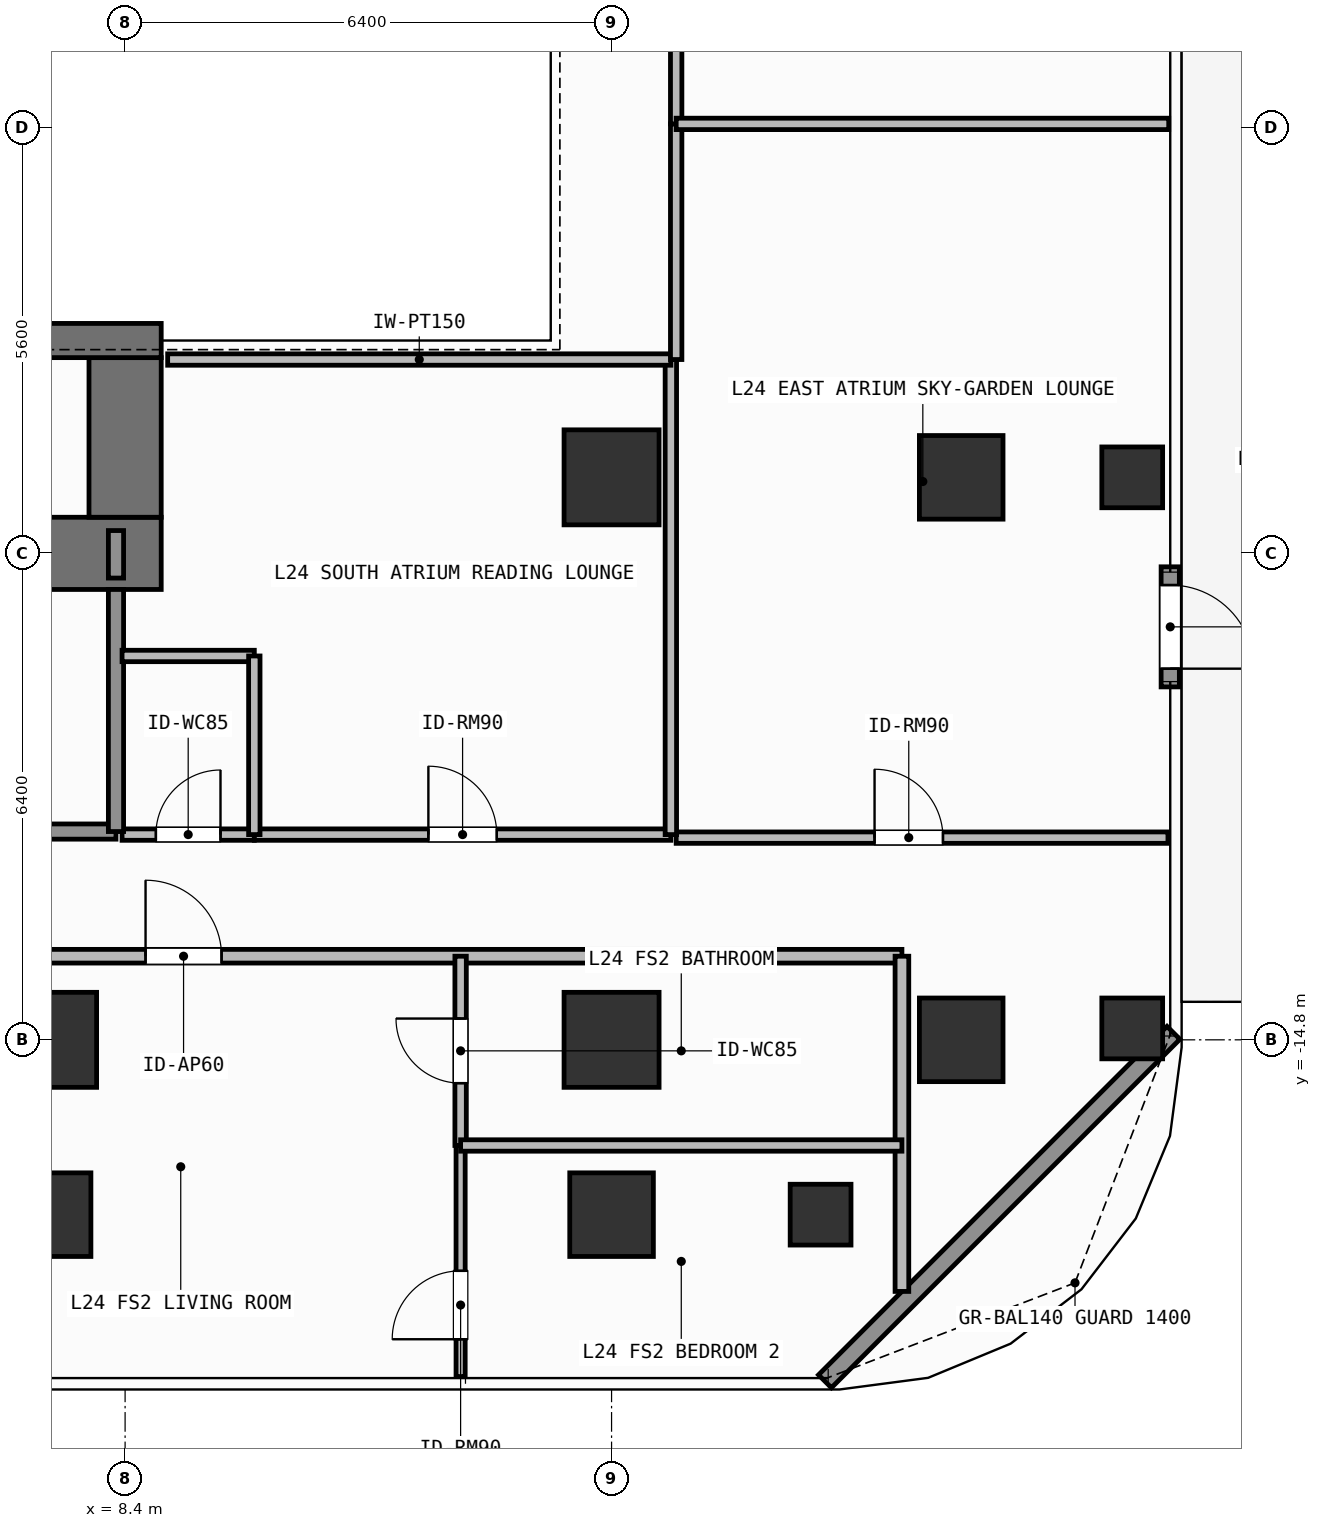
"""IFC4 building model, lengths in metres.
Left out: names, types, materials, properties, quantities, classifications, styles, units other than length and angle.
Written with IfcOpenShell. Run it as: python <this file> out.ifc"""

import sys

from ifc_helpers import new_model, si_unit, direction, frame, frame_2d, origin, origin_2d, place, context, subcontext, project, spatial, rectangle, hollow_rectangle, extrude, element, fill, save


model = new_model("IFC4")
c1 = context("Model", 3, precision=1e-05, world=origin(), true_north=direction((0.0, 1.0)))
c2 = subcontext(c1, "Body", "Model", "MODEL_VIEW")
j1 = project(units=[si_unit("LENGTHUNIT", "METRE"), si_unit("PLANEANGLEUNIT", "RADIAN")], contexts=[c1])
p1 = place(None, origin())
s1 = spatial("IfcSite", under=j1, at=p1, CompositionType="ELEMENT")
p2 = place(p1, origin())
s2 = spatial("IfcBuilding", under=s1, at=p2, CompositionType="ELEMENT")
p3 = place(p2, frame((0.0, 0.0, 96.9)))
s3 = spatial("IfcBuildingStorey", under=s2, at=p3, CompositionType="ELEMENT", Elevation=96.9)
p4 = place(p3, frame((6.12, -8.4, 0.0), z_axis=(0.0, 0.0, 1.0), x_axis=(1.0, 0.0, 0.0)))
e1 = element("IfcWall", 1, at=p4, inside=s3, PredefinedType="SHEAR", context=c2, shape_type="SweptSolid", body=[
    extrude(rectangle(XDim=2.755, YDim=0.95, at=frame_2d((1.377, 0.0))), origin(), (0.0, 0.0, 1.0), 3.9),
])
p5 = place(p3, frame((8.4, -7.925, 0.0), z_axis=(0.0, 0.0, 1.0), x_axis=(0.0, 1.0, 0.0)))
e2 = element("IfcWall", 2, at=p5, inside=s3, PredefinedType="SHEAR", context=c2, shape_type="SweptSolid", body=[
    extrude(rectangle(XDim=2.1, YDim=0.95, at=frame_2d((1.05, 0.0))), origin(), (0.0, 0.0, 1.0), 3.9),
])
p6 = place(p3, frame((3.045, -5.6, 0.0), z_axis=(0.0, 0.0, 1.0), x_axis=(1.0, 0.0, 0.0)))
e3 = element("IfcWall", 3, at=p6, inside=s3, PredefinedType="SHEAR", context=c2, shape_type="SweptSolid", body=[
    extrude(rectangle(XDim=5.83, YDim=0.45, at=frame_2d((2.915, 0.0))), origin(), (0.0, 0.0, 1.0), 3.9),
])
for number, where, z_axis, x_axis in (
    (4, (7.4, -14.8, 0.0), (0.0, 0.0, 1.0), (1.0, 0.0, 0.0)),
    (5, (14.8, -14.8, 0.0), (0.0, 0.0, 1.0), (1.0, 0.0, 0.0)),
    (6, (14.8, -7.4, 0.0), (0.0, 0.0, 1.0), (1.0, 0.0, 0.0)),
):
    element("IfcColumn", number, at=place(p3, frame(where, z_axis=z_axis, x_axis=x_axis)), inside=s3, PredefinedType="COLUMN", context=c2, shape_type="SweptSolid", body=[
        extrude(rectangle(XDim=1.25, YDim=1.25, at=origin_2d()), origin(), (0.0, 0.0, 1.0), 3.9),
    ])
for number, where, z_axis, x_axis in (
    (7, (19.4, -14.8, 0.0), (0.0, 0.0, 1.0), (1.0, 0.0, 0.0)),
    (8, (19.4, -7.4, 0.0), (0.0, 0.0, 1.0), (1.0, 0.0, 0.0)),
    (9, (7.4, -17.1, 0.0), (0.0, 0.0, 1.0), (1.0, 0.0, 0.0)),
    (10, (14.8, -17.1, 0.0), (0.0, 0.0, 1.0), (1.0, 0.0, 0.0)),
):
    element("IfcColumn", number, at=place(p3, frame(where, z_axis=z_axis, x_axis=x_axis)), inside=s3, PredefinedType="COLUMN", context=c2, shape_type="SweptSolid", body=[
        extrude(rectangle(XDim=1.1, YDim=1.1, at=origin_2d()), origin(), (0.0, 0.0, 1.0), 3.9),
    ])
for number, where, z_axis, x_axis in (
    (11, (17.55, -17.1, 0.0), (0.0, 0.0, 1.0), (1.0, 0.0, 0.0)),
    (12, (21.65, -14.65, 0.0), (0.0, 0.0, 1.0), (1.0, 0.0, 0.0)),
    (13, (21.65, -7.4, 0.0), (0.0, 0.0, 1.0), (1.0, 0.0, 0.0)),
):
    element("IfcColumn", number, at=place(p3, frame(where, z_axis=z_axis, x_axis=x_axis)), inside=s3, PredefinedType="COLUMN", context=c2, shape_type="SweptSolid", body=[
        extrude(hollow_rectangle(XDim=0.8, YDim=0.8, WallThickness=0.036, at=origin_2d()), origin(), (0.0, 0.0, 1.0), 3.9),
    ])
p7 = place(p3, frame((22.15, -8.577, 0.0), z_axis=(0.0, 0.0, 1.0), x_axis=(0.0, -1.0, 0.0)))
e14 = element("IfcWall", 14, at=p7, inside=s3, PredefinedType="SOLIDWALL", context=c2, shape_type="SweptSolid", body=[
    extrude(rectangle(XDim=1.58, YDim=0.24, at=frame_2d((0.79, 0.0))), origin(), (0.0, 0.0, 1.0), 3.68),
])
p8 = place(p7, frame((0.24, 0.0, 0.0)))
e15 = element("IfcOpeningElement", 15, at=p8, cuts=e14, PredefinedType="OPENING", context=c2, shape_type="SweptSolid", body=[
    extrude(rectangle(XDim=1.1, YDim=2.2, at=frame_2d((0.55, 1.1))), frame((0.0, 0.13, 0.0), z_axis=(0.0, -1.0, 0.0), x_axis=(1.0, 0.0, 0.0)), (0.0, 0.0, 1.0), 0.26),
])
p9 = place(p3, frame((22.192, -14.708, 0.0), z_axis=(0.0, 0.0, 1.0), x_axis=(-0.707087954376, -0.707125607496, 0.0)))
e16 = element("IfcWall", 16, at=p9, inside=s3, PredefinedType="SOLIDWALL", context=c2, shape_type="SweptSolid", body=[
    extrude(rectangle(XDim=6.484, YDim=0.24, at=frame_2d((3.242, 0.0))), origin(), (0.0, 0.0, 1.0), 3.68),
])
p10 = place(p3, frame((4.58, -12.06, 0.0), z_axis=(0.0, 0.0, 1.0), x_axis=(1.0, 0.0, 0.0)))
e17 = element("IfcWall", 17, at=p10, inside=s3, PredefinedType="SOLIDWALL", context=c2, shape_type="SweptSolid", body=[
    extrude(rectangle(XDim=3.7, YDim=0.2, at=frame_2d((1.85, 0.0))), origin(), (0.0, 0.0, 1.0), 3.68),
])
p11 = place(p10, frame((1.212, 0.0, 0.0)))
e18 = element("IfcOpeningElement", 18, at=p11, cuts=e17, PredefinedType="OPENING", context=c2, shape_type="SweptSolid", body=[
    extrude(rectangle(XDim=1.1, YDim=2.15, at=frame_2d((0.55, 1.075))), frame((0.0, 0.11, 0.0), z_axis=(0.0, -1.0, 0.0), x_axis=(1.0, 0.0, 0.0)), (0.0, 0.0, 1.0), 0.22),
])
p12 = place(p3, frame((8.36, -12.1, 0.0), z_axis=(0.0, 0.0, 1.0), x_axis=(1.0, 0.0, 0.0)))
e19 = element("IfcWall", 19, at=p12, inside=s3, PredefinedType="PARTITIONING", context=c2, shape_type="SweptSolid", body=[
    extrude(rectangle(XDim=1.74, YDim=0.15, at=frame_2d((0.87, 0.0))), origin(), (0.0, 0.0, 1.0), 3.68),
])
p13 = place(p12, frame((0.445, 0.0, 0.0)))
e20 = element("IfcOpeningElement", 20, at=p13, cuts=e19, PredefinedType="OPENING", context=c2, shape_type="SweptSolid", body=[
    extrude(rectangle(XDim=0.85, YDim=2.1, at=frame_2d((0.425, 1.05))), frame((0.0, 0.085, 0.0), z_axis=(0.0, -1.0, 0.0), x_axis=(1.0, 0.0, 0.0)), (0.0, 0.0, 1.0), 0.17),
])
p14 = place(p3, frame((10.1, -12.1, 0.0), z_axis=(0.0, 0.0, 1.0), x_axis=(1.0, 0.0, 0.0)))
e21 = element("IfcWall", 21, at=p14, inside=s3, PredefinedType="PARTITIONING", context=c2, shape_type="SweptSolid", body=[
    extrude(rectangle(XDim=5.48, YDim=0.15, at=frame_2d((2.74, 0.0))), origin(), (0.0, 0.0, 1.0), 3.68),
])
p15 = place(p14, frame((2.29, 0.0, 0.0)))
e22 = element("IfcOpeningElement", 22, at=p15, cuts=e21, PredefinedType="OPENING", context=c2, shape_type="SweptSolid", body=[
    extrude(rectangle(XDim=0.9, YDim=2.1, at=frame_2d((0.45, 1.05))), frame((0.0, 0.085, 0.0), z_axis=(0.0, -1.0, 0.0), x_axis=(1.0, 0.0, 0.0)), (0.0, 0.0, 1.0), 0.17),
])
p16 = place(p3, frame((0.974, -13.7, 0.0), z_axis=(0.0, 0.0, 1.0), x_axis=(1.0, 0.0, 0.0)))
e23 = element("IfcWall", 23, at=p16, inside=s3, PredefinedType="PARTITIONING", context=c2, shape_type="SweptSolid", body=[
    extrude(rectangle(XDim=17.646, YDim=0.18, at=frame_2d((8.823, 0.0))), origin(), (0.0, 0.0, 1.0), 3.68),
])
p17 = place(p16, frame((7.695, 0.0, 0.0)))
e24 = element("IfcOpeningElement", 24, at=p17, cuts=e23, PredefinedType="OPENING", context=c2, shape_type="SweptSolid", body=[
    extrude(rectangle(XDim=1.0, YDim=2.2, at=frame_2d((0.5, 1.1))), frame((0.0, 0.1, 0.0), z_axis=(0.0, -1.0, 0.0), x_axis=(1.0, 0.0, 0.0)), (0.0, 0.0, 1.0), 0.2),
])
p18 = place(p3, frame((12.814, -16.19, 0.0), z_axis=(0.0, 0.0, 1.0), x_axis=(0.0, 1.0, 0.0)))
e25 = element("IfcWall", 25, at=p18, inside=s3, PredefinedType="PARTITIONING", context=c2, shape_type="SweptSolid", body=[
    extrude(rectangle(XDim=2.49, YDim=0.15, at=frame_2d((1.245, 0.0))), origin(), (0.0, 0.0, 1.0), 3.68),
])
p19 = place(p18, frame((0.82, 0.0, 0.0)))
e26 = element("IfcOpeningElement", 26, at=p19, cuts=e25, PredefinedType="OPENING", context=c2, shape_type="SweptSolid", body=[
    extrude(rectangle(XDim=0.85, YDim=2.1, at=frame_2d((0.425, 1.05))), frame((0.0, 0.085, 0.0), z_axis=(0.0, -1.0, 0.0), x_axis=(1.0, 0.0, 0.0)), (0.0, 0.0, 1.0), 0.17),
])
p20 = place(p3, frame((12.814, -19.23, 0.0), z_axis=(0.0, 0.0, 1.0), x_axis=(0.0, 1.0, 0.0)))
e27 = element("IfcWall", 27, at=p20, inside=s3, PredefinedType="PARTITIONING", context=c2, shape_type="SweptSolid", body=[
    extrude(rectangle(XDim=3.04, YDim=0.12, at=frame_2d((1.52, 0.0))), origin(), (0.0, 0.0, 1.0), 3.68),
])
p21 = place(p20, frame((0.491, 0.0, 0.0)))
e28 = element("IfcOpeningElement", 28, at=p21, cuts=e27, PredefinedType="OPENING", context=c2, shape_type="SweptSolid", body=[
    extrude(rectangle(XDim=0.9, YDim=2.1, at=frame_2d((0.45, 1.05))), frame((0.0, 0.07, 0.0), z_axis=(0.0, -1.0, 0.0), x_axis=(1.0, 0.0, 0.0)), (0.0, 0.0, 1.0), 0.14),
])
p22 = place(p3, frame((15.65, -12.14, 0.0), z_axis=(0.0, 0.0, 1.0), x_axis=(1.0, 0.0, 0.0)))
e29 = element("IfcWall", 29, at=p22, inside=s3, PredefinedType="PARTITIONING", context=c2, shape_type="SweptSolid", body=[
    extrude(rectangle(XDim=6.47, YDim=0.15, at=frame_2d((3.235, 0.0))), origin(), (0.0, 0.0, 1.0), 3.68),
])
p23 = place(p22, frame((2.61, 0.0, 0.0)))
e30 = element("IfcOpeningElement", 30, at=p23, cuts=e29, PredefinedType="OPENING", context=c2, shape_type="SweptSolid", body=[
    extrude(rectangle(XDim=0.9, YDim=2.1, at=frame_2d((0.45, 1.05))), frame((0.0, 0.085, 0.0), z_axis=(0.0, -1.0, 0.0), x_axis=(1.0, 0.0, 0.0)), (0.0, 0.0, 1.0), 0.17),
])
p24 = place(p3, frame((8.28, -12.06, 0.0), z_axis=(0.0, 0.0, 1.0), x_axis=(0.0, 1.0, 0.0)))
e31 = element("IfcWall", 31, at=p24, inside=s3, PredefinedType="SOLIDWALL", context=c2, shape_type="SweptSolid", body=[
    extrude(rectangle(XDim=3.185, YDim=0.2, at=frame_2d((1.593, 0.0))), origin(), (0.0, 0.0, 1.0), 3.68),
])
p25 = place(p3, frame((8.28, -8.725, 0.0), z_axis=(0.0, 0.0, 1.0), x_axis=(0.0, 1.0, 0.0)))
e32 = element("IfcWall", 32, at=p25, inside=s3, PredefinedType="SOLIDWALL", context=c2, shape_type="SweptSolid", body=[
    extrude(rectangle(XDim=0.625, YDim=0.2, at=frame_2d((0.312, 0.0))), origin(), (0.0, 0.0, 1.0), 3.68),
])
p26 = place(p3, frame((8.36, -9.75, 0.0), z_axis=(0.0, 0.0, 1.0), x_axis=(1.0, 0.0, 0.0)))
e33 = element("IfcWall", 33, at=p26, inside=s3, PredefinedType="PARTITIONING", context=c2, shape_type="SweptSolid", body=[
    extrude(rectangle(XDim=1.74, YDim=0.15, at=frame_2d((0.87, 0.0))), origin(), (0.0, 0.0, 1.0), 3.68),
])
p27 = place(p3, frame((10.1, -12.1, 0.0), z_axis=(0.0, 0.0, 1.0), x_axis=(0.0, 1.0, 0.0)))
e34 = element("IfcWall", 34, at=p27, inside=s3, PredefinedType="PARTITIONING", context=c2, shape_type="SweptSolid", body=[
    extrude(rectangle(XDim=2.35, YDim=0.15, at=frame_2d((1.175, 0.0))), origin(), (0.0, 0.0, 1.0), 3.68),
])
p28 = place(p3, frame((15.58, -12.1, 0.0), z_axis=(0.0, 0.0, 1.0), x_axis=(0.0, 1.0, 0.0)))
e35 = element("IfcWall", 35, at=p28, inside=s3, PredefinedType="PARTITIONING", context=c2, shape_type="SweptSolid", body=[
    extrude(rectangle(XDim=6.25, YDim=0.15, at=frame_2d((3.125, 0.0))), origin(), (0.0, 0.0, 1.0), 3.68),
])
p29 = place(p3, frame((8.96, -5.85, 0.0), z_axis=(0.0, 0.0, 1.0), x_axis=(1.0, 0.0, 0.0)))
e36 = element("IfcWall", 36, at=p29, inside=s3, PredefinedType="PARTITIONING", context=c2, shape_type="SweptSolid", body=[
    extrude(rectangle(XDim=6.62, YDim=0.15, at=frame_2d((3.31, 0.0))), origin(), (0.0, 0.0, 1.0), 3.68),
])
p30 = place(p3, frame((18.62, -18.11, 0.0), z_axis=(0.0, 0.0, 1.0), x_axis=(0.0, 1.0, 0.0)))
e37 = element("IfcWall", 37, at=p30, inside=s3, PredefinedType="PARTITIONING", context=c2, shape_type="SweptSolid", body=[
    extrude(rectangle(XDim=4.41, YDim=0.18, at=frame_2d((2.205, 0.0))), origin(), (0.0, 0.0, 1.0), 3.68),
])
p31 = place(p3, frame((12.814, -16.19, 0.0), z_axis=(0.0, 0.0, 1.0), x_axis=(1.0, 0.0, 0.0)))
e38 = element("IfcWall", 38, at=p31, inside=s3, PredefinedType="PARTITIONING", context=c2, shape_type="SweptSolid", body=[
    extrude(rectangle(XDim=5.806, YDim=0.15, at=frame_2d((2.903, 0.0))), origin(), (0.0, 0.0, 1.0), 3.68),
])
p32 = place(p3, frame((15.65, -5.85, 0.0), z_axis=(0.0, 0.0, 1.0), x_axis=(0.0, 1.0, 0.0)))
e39 = element("IfcWall", 39, at=p32, inside=s3, PredefinedType="PARTITIONING", context=c2, shape_type="SweptSolid", body=[
    extrude(rectangle(XDim=3.1, YDim=0.15, at=frame_2d((1.55, 0.0))), origin(), (0.0, 0.0, 1.0), 3.68),
])
p33 = place(p3, frame((15.65, -2.75, 0.0), z_axis=(0.0, 0.0, 1.0), x_axis=(0.0, 1.0, 0.0)))
e40 = element("IfcWall", 40, at=p33, inside=s3, PredefinedType="PARTITIONING", context=c2, shape_type="SweptSolid", body=[
    extrude(rectangle(XDim=8.6, YDim=0.15, at=frame_2d((4.3, 0.0))), origin(), (0.0, 0.0, 1.0), 3.68),
])
p34 = place(p3, frame((15.65, -2.75, 0.0), z_axis=(0.0, 0.0, 1.0), x_axis=(1.0, 0.0, 0.0)))
e41 = element("IfcWall", 41, at=p34, inside=s3, PredefinedType="PARTITIONING", context=c2, shape_type="SweptSolid", body=[
    extrude(rectangle(XDim=6.48, YDim=0.15, at=frame_2d((3.24, 0.0))), origin(), (0.0, 0.0, 1.0), 3.68),
])
p35 = place(p8, origin())
e42 = element("IfcDoor", 42, at=p35, inside=s3, OperationType="SINGLE_SWING_RIGHT", PredefinedType="DOOR", context=c2, shape_type="SweptSolid", body=[
    extrude(rectangle(XDim=1.1, YDim=2.2, at=frame_2d((0.55, 1.1))), frame((0.0, 0.025, 0.0), z_axis=(0.0, -1.0, 0.0), x_axis=(1.0, 0.0, 0.0)), (0.0, 0.0, 1.0), 0.05),
])
fill(e15, e42)
p36 = place(p13, origin())
e43 = element("IfcDoor", 43, at=p36, inside=s3, OperationType="SINGLE_SWING_RIGHT", PredefinedType="DOOR", context=c2, shape_type="SweptSolid", body=[
    extrude(rectangle(XDim=0.85, YDim=2.1, at=frame_2d((0.425, 1.05))), frame((0.0, 0.025, 0.0), z_axis=(0.0, -1.0, 0.0), x_axis=(1.0, 0.0, 0.0)), (0.0, 0.0, 1.0), 0.05),
])
fill(e20, e43)
p37 = place(p15, origin())
e44 = element("IfcDoor", 44, at=p37, inside=s3, OperationType="SINGLE_SWING_LEFT", PredefinedType="DOOR", context=c2, shape_type="SweptSolid", body=[
    extrude(rectangle(XDim=0.9, YDim=2.1, at=frame_2d((0.45, 1.05))), frame((0.0, 0.025, 0.0), z_axis=(0.0, -1.0, 0.0), x_axis=(1.0, 0.0, 0.0)), (0.0, 0.0, 1.0), 0.05),
])
fill(e22, e44)
p38 = place(p17, origin())
e45 = element("IfcDoor", 45, at=p38, inside=s3, OperationType="SINGLE_SWING_LEFT", PredefinedType="DOOR", context=c2, shape_type="SweptSolid", body=[
    extrude(rectangle(XDim=1.0, YDim=2.2, at=frame_2d((0.5, 1.1))), frame((0.0, 0.025, 0.0), z_axis=(0.0, -1.0, 0.0), x_axis=(1.0, 0.0, 0.0)), (0.0, 0.0, 1.0), 0.05),
])
fill(e24, e45)
p39 = place(p19, origin())
e46 = element("IfcDoor", 46, at=p39, inside=s3, OperationType="SINGLE_SWING_RIGHT", PredefinedType="DOOR", context=c2, shape_type="SweptSolid", body=[
    extrude(rectangle(XDim=0.85, YDim=2.1, at=frame_2d((0.425, 1.05))), frame((0.0, 0.025, 0.0), z_axis=(0.0, -1.0, 0.0), x_axis=(1.0, 0.0, 0.0)), (0.0, 0.0, 1.0), 0.05),
])
fill(e26, e46)
p40 = place(p21, origin())
e47 = element("IfcDoor", 47, at=p40, inside=s3, OperationType="SINGLE_SWING_LEFT", PredefinedType="DOOR", context=c2, shape_type="SweptSolid", body=[
    extrude(rectangle(XDim=0.9, YDim=2.1, at=frame_2d((0.45, 1.05))), frame((0.0, 0.025, 0.0), z_axis=(0.0, -1.0, 0.0), x_axis=(1.0, 0.0, 0.0)), (0.0, 0.0, 1.0), 0.05),
])
fill(e28, e47)
p41 = place(p23, origin())
e48 = element("IfcDoor", 48, at=p41, inside=s3, OperationType="SINGLE_SWING_LEFT", PredefinedType="DOOR", context=c2, shape_type="SweptSolid", body=[
    extrude(rectangle(XDim=0.9, YDim=2.1, at=frame_2d((0.45, 1.05))), frame((0.0, 0.025, 0.0), z_axis=(0.0, -1.0, 0.0), x_axis=(1.0, 0.0, 0.0)), (0.0, 0.0, 1.0), 0.05),
])
fill(e30, e48)
save(model, sys.argv[1])
